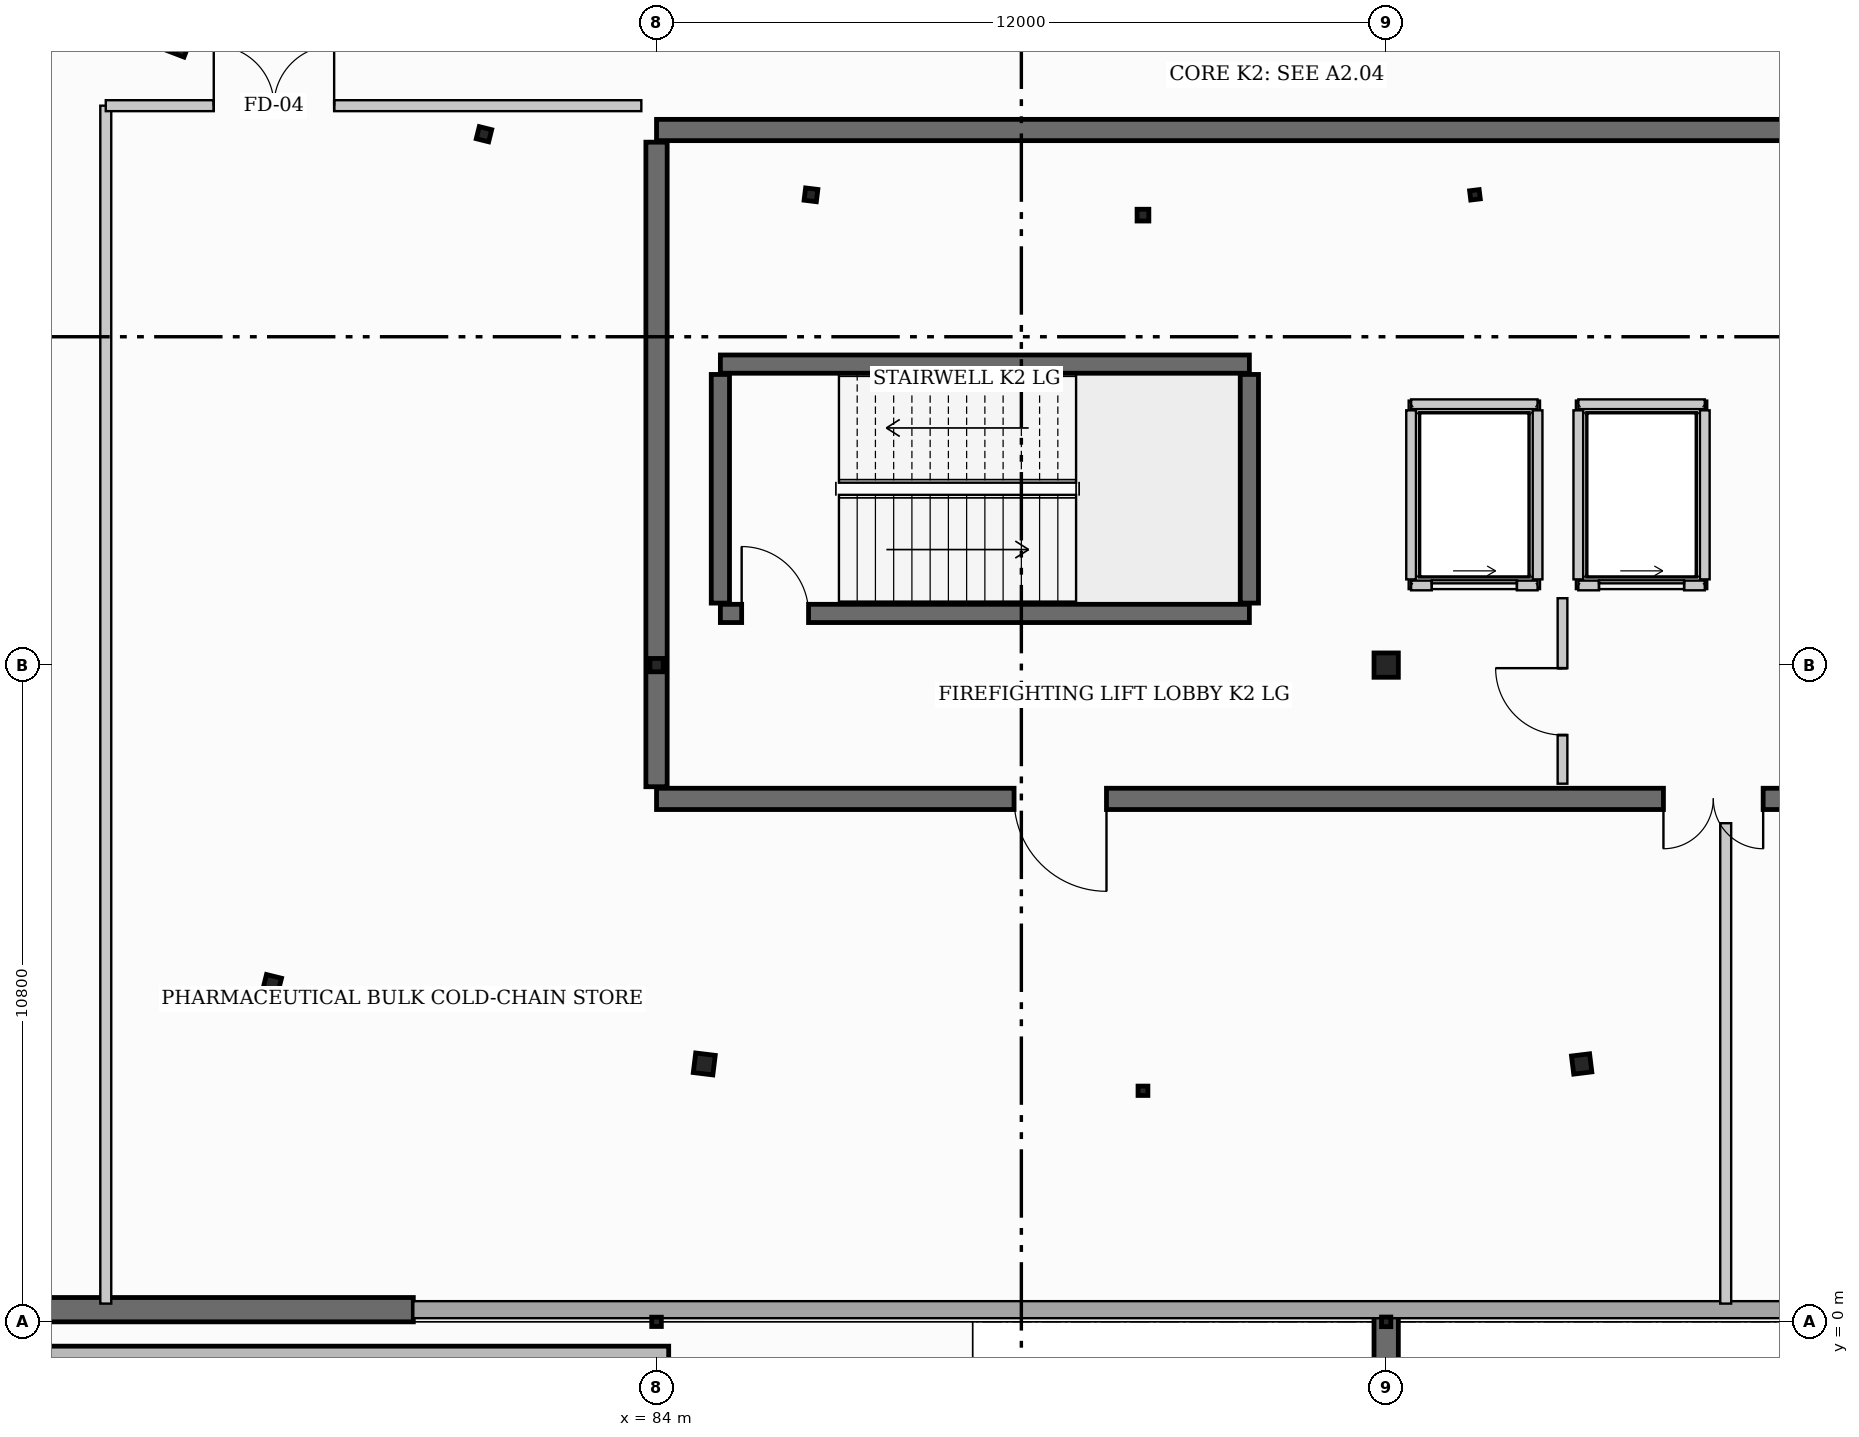
"""IFC4 building model, lengths in metres.
Left out: names, types, materials, properties, quantities, classifications, styles, units other than length and angle.
Written with IfcOpenShell. Run it as: python <this file> out.ifc"""

import sys

from ifc_helpers import new_model, si_unit, direction, frame, frame_2d, origin, origin_2d, place, context, subcontext, project, spatial, rectangle, hollow_rectangle, hollow_circle, i_section, extrude, element, fill, save


model = new_model("IFC4")
c1 = context("Model", 3, precision=1e-05, world=origin(), true_north=direction((0.0, 1.0)))
c2 = subcontext(c1, "Body", "Model", "MODEL_VIEW")
j1 = project(units=[si_unit("LENGTHUNIT", "METRE"), si_unit("PLANEANGLEUNIT", "RADIAN")], contexts=[c1])
p1 = place(None, origin())
s1 = spatial("IfcSite", under=j1, at=p1, CompositionType="ELEMENT")
p2 = place(p1, origin())
s2 = spatial("IfcBuilding", under=s1, at=p2, CompositionType="ELEMENT")
p3 = place(p2, frame((0.0, 0.0, -4.8)))
s3 = spatial("IfcBuildingStorey", under=s2, at=p3, CompositionType="ELEMENT", Elevation=-4.8)
p4 = place(p3, frame((50.0, 0.2, 0.0), z_axis=(0.0, 0.0, 1.0), x_axis=(1.0, 0.0, 0.0)))
e1 = element("IfcWall", 1, at=p4, inside=s3, PredefinedType="USERDEFINED", context=c2, shape_type="SweptSolid", body=[
    extrude(rectangle(XDim=30.0, YDim=0.4, at=frame_2d((15.0, 0.0))), origin(), (0.0, 0.0, 1.0), 4.8),
])
p5 = place(p3, frame((96.0, -4.2, 0.0), z_axis=(0.0, 0.0, 1.0), x_axis=(0.0, 1.0, 0.0)))
e2 = element("IfcWall", 2, at=p5, inside=s3, PredefinedType="USERDEFINED", context=c2, shape_type="SweptSolid", body=[
    extrude(rectangle(XDim=4.4, YDim=0.4, at=frame_2d((2.2, 0.0))), origin(), (0.0, 0.0, 1.0), 4.8),
])
p6 = place(p3, frame((84.0, 0.0, 0.0), z_axis=(0.0, 0.0, 1.0), x_axis=(0.0, 1.0, 0.0)))
e3 = element("IfcColumn", 3, at=p6, inside=s3, PredefinedType="COLUMN", context=c2, shape_type="SweptSolid", body=[
    extrude(i_section(OverallWidth=0.153, OverallDepth=0.158, WebThickness=0.007, FlangeThickness=0.01, at=origin_2d()), origin(), (0.0, 0.0, 1.0), 4.8),
])
p7 = place(p3, frame((84.0, 10.8, 0.0), z_axis=(0.0, 0.0, 1.0), x_axis=(0.0, 1.0, 0.0)))
e4 = element("IfcColumn", 4, at=p7, inside=s3, PredefinedType="COLUMN", context=c2, shape_type="SweptSolid", body=[
    extrude(hollow_circle(Radius=0.11, WallThickness=0.01, at=origin_2d()), origin(), (0.0, 0.0, 1.0), 4.8),
])
p8 = place(p3, frame((96.0, 0.0, 0.0), z_axis=(0.0, 0.0, 1.0), x_axis=(1.0, 0.0, 0.0)))
e5 = element("IfcColumn", 5, at=p8, inside=s3, PredefinedType="COLUMN", context=c2, shape_type="SweptSolid", body=[
    extrude(i_section(OverallWidth=0.153, OverallDepth=0.158, WebThickness=0.007, FlangeThickness=0.01, at=origin_2d()), origin(), (0.0, 0.0, 1.0), 4.8),
])
p9 = place(p3, frame((96.0, 10.8, 0.0), z_axis=(0.0, 0.0, 1.0), x_axis=(1.0, 0.0, 0.0)))
e6 = element("IfcColumn", 6, at=p9, inside=s3, PredefinedType="COLUMN", context=c2, shape_type="SweptSolid", body=[
    extrude(i_section(OverallWidth=0.4, OverallDepth=0.4, WebThickness=0.02, FlangeThickness=0.028, at=origin_2d()), origin(), (0.0, 0.0, 1.0), 4.8),
])
p10 = place(p3, frame((75.945, 21.176, 0.0), z_axis=(0.0, 0.0, 1.0), x_axis=(0.358367949545, 0.933580426497, 0.0)))
e7 = element("IfcColumn", 7, at=p10, inside=s3, PredefinedType="PILASTER", context=c2, shape_type="SweptSolid", body=[
    extrude(rectangle(XDim=0.5, YDim=0.8, at=origin_2d()), origin(), (0.0, 0.0, 1.0), 4.8),
])
p11 = place(p3, frame((77.678, 5.558, 0.0), z_axis=(0.0, 0.0, 1.0), x_axis=(0.2419218956, 0.970295726276, 0.0)))
e8 = element("IfcColumn", 8, at=p11, inside=s3, PredefinedType="COLUMN", context=c2, shape_type="SweptSolid", body=[
    extrude(i_section(OverallWidth=0.254, OverallDepth=0.254, WebThickness=0.009, FlangeThickness=0.014, at=origin_2d()), origin(), (0.0, 0.0, 1.0), 4.8),
])
p12 = place(p3, frame((81.162, 19.531, 0.0), z_axis=(0.0, 0.0, 1.0), x_axis=(0.2419218956, 0.970295726276, 0.0)))
e9 = element("IfcColumn", 9, at=p12, inside=s3, PredefinedType="COLUMN", context=c2, shape_type="SweptSolid", body=[
    extrude(i_section(OverallWidth=0.205, OverallDepth=0.21, WebThickness=0.009, FlangeThickness=0.014, at=origin_2d()), origin(), (0.0, 0.0, 1.0), 4.8),
])
p13 = place(p3, frame((84.785, 4.241, 0.0), z_axis=(0.0, 0.0, 1.0), x_axis=(0.121869343405, 0.992546151641, 0.0)))
e10 = element("IfcColumn", 10, at=p13, inside=s3, PredefinedType="COLUMN", context=c2, shape_type="SweptSolid", body=[
    extrude(hollow_circle(Radius=0.162, WallThickness=0.013, at=origin_2d()), origin(), (0.0, 0.0, 1.0), 4.8),
])
p14 = place(p3, frame((86.54, 18.534, 0.0), z_axis=(0.0, 0.0, 1.0), x_axis=(0.121869343405, 0.992546151641, 0.0)))
e11 = element("IfcColumn", 11, at=p14, inside=s3, PredefinedType="COLUMN", context=c2, shape_type="SweptSolid", body=[
    extrude(i_section(OverallWidth=0.203, OverallDepth=0.203, WebThickness=0.007, FlangeThickness=0.011, at=origin_2d()), origin(), (0.0, 0.0, 1.0), 4.8),
])
p15 = place(p3, frame((92.0, 3.8, 0.0), z_axis=(0.0, 0.0, 1.0), x_axis=(0.0, 1.0, 0.0)))
e12 = element("IfcColumn", 12, at=p15, inside=s3, PredefinedType="COLUMN", context=c2, shape_type="SweptSolid", body=[
    extrude(i_section(OverallWidth=0.154, OverallDepth=0.162, WebThickness=0.008, FlangeThickness=0.011, at=origin_2d()), origin(), (0.0, 0.0, 1.0), 4.8),
])
p16 = place(p3, frame((92.0, 18.2, 0.0), z_axis=(0.0, 0.0, 1.0), x_axis=(0.0, 1.0, 0.0)))
e13 = element("IfcColumn", 13, at=p16, inside=s3, PredefinedType="COLUMN", context=c2, shape_type="SweptSolid", body=[
    extrude(hollow_circle(Radius=0.097, WallThickness=0.008, at=origin_2d()), origin(), (0.0, 0.0, 1.0), 4.8),
])
p17 = place(p3, frame((99.215, 4.241, 0.0), z_axis=(0.0, 0.0, 1.0), x_axis=(-0.121869343405, 0.992546151641, 0.0)))
e14 = element("IfcColumn", 14, at=p17, inside=s3, PredefinedType="COLUMN", context=c2, shape_type="SweptSolid", body=[
    extrude(hollow_rectangle(XDim=0.3, YDim=0.3, WallThickness=0.012, at=origin_2d()), origin(), (0.0, 0.0, 1.0), 4.8),
])
p18 = place(p3, frame((97.46, 18.534, 0.0), z_axis=(0.0, 0.0, 1.0), x_axis=(-0.121869343405, 0.992546151641, 0.0)))
e15 = element("IfcColumn", 15, at=p18, inside=s3, PredefinedType="COLUMN", context=c2, shape_type="SweptSolid", body=[
    extrude(i_section(OverallWidth=0.153, OverallDepth=0.158, WebThickness=0.007, FlangeThickness=0.01, at=origin_2d()), origin(), (0.0, 0.0, 1.0), 4.8),
])
p19 = place(p3, frame((84.0, 19.6, 0.0), z_axis=(0.0, 0.0, 1.0), x_axis=(1.0, 0.0, 0.0)))
e16 = element("IfcWall", 16, at=p19, inside=s3, PredefinedType="SHEAR", context=c2, shape_type="SweptSolid", body=[
    extrude(rectangle(XDim=20.4, YDim=0.35, at=frame_2d((10.2, 0.0))), origin(), (0.0, 0.0, 1.0), 4.8),
])
p20 = place(p3, frame((104.4, 8.6, 0.0), z_axis=(0.0, 0.0, 1.0), x_axis=(-1.0, 0.0, 0.0)))
e17 = element("IfcWall", 17, at=p20, inside=s3, PredefinedType="SHEAR", context=c2, shape_type="SweptSolid", body=[
    extrude(rectangle(XDim=20.4, YDim=0.35, at=frame_2d((10.2, 0.0))), origin(), (0.0, 0.0, 1.0), 4.8),
])
p21 = place(p20, frame((2.2, 0.0, 0.0)))
e18 = element("IfcOpeningElement", 18, at=p21, cuts=e17, PredefinedType="OPENING", context=c2, shape_type="SweptSolid", body=[
    extrude(rectangle(XDim=1.64, YDim=2.2, at=frame_2d((0.82, 1.1))), frame((0.0, 0.185, 0.0), z_axis=(0.0, -1.0, 0.0), x_axis=(1.0, 0.0, 0.0)), (0.0, 0.0, 1.0), 0.37),
])
p22 = place(p20, frame((13.0, 0.0, 0.0)))
e19 = element("IfcOpeningElement", 19, at=p22, cuts=e17, PredefinedType="OPENING", context=c2, shape_type="SweptSolid", body=[
    extrude(rectangle(XDim=1.52, YDim=2.16, at=frame_2d((0.76, 1.08))), frame((0.0, 0.185, 0.0), z_axis=(0.0, -1.0, 0.0), x_axis=(1.0, 0.0, 0.0)), (0.0, 0.0, 1.0), 0.37),
])
p23 = place(p3, frame((84.0, 8.8, 0.0), z_axis=(0.0, 0.0, 1.0), x_axis=(0.0, 1.0, 0.0)))
e20 = element("IfcWall", 20, at=p23, inside=s3, PredefinedType="SHEAR", context=c2, shape_type="SweptSolid", body=[
    extrude(rectangle(XDim=10.6, YDim=0.35, at=frame_2d((5.3, 0.0))), origin(), (0.0, 0.0, 1.0), 4.8),
])
p24 = place(p3, frame((85.05, 11.65, 0.0), z_axis=(0.0, 0.0, 1.0), x_axis=(1.0, 0.0, 0.0)))
e21 = element("IfcWall", 21, at=p24, inside=s3, PredefinedType="SHEAR", context=c2, shape_type="SweptSolid", body=[
    extrude(rectangle(XDim=8.7, YDim=0.3, at=frame_2d((4.35, 0.0))), origin(), (0.0, 0.0, 1.0), 4.8),
])
p25 = place(p24, frame((0.35, 0.0, 0.0)))
e22 = element("IfcOpeningElement", 22, at=p25, cuts=e21, PredefinedType="OPENING", context=c2, shape_type="SweptSolid", body=[
    extrude(rectangle(XDim=1.1, YDim=2.15, at=frame_2d((0.55, 1.075))), frame((0.0, 0.16, 0.0), z_axis=(0.0, -1.0, 0.0), x_axis=(1.0, 0.0, 0.0)), (0.0, 0.0, 1.0), 0.32),
])
p26 = place(p3, frame((93.75, 15.75, 0.0), z_axis=(0.0, 0.0, 1.0), x_axis=(-1.0, 0.0, 0.0)))
e23 = element("IfcWall", 23, at=p26, inside=s3, PredefinedType="SHEAR", context=c2, shape_type="SweptSolid", body=[
    extrude(rectangle(XDim=8.7, YDim=0.3, at=frame_2d((4.35, 0.0))), origin(), (0.0, 0.0, 1.0), 4.8),
])
for number, where, z_axis, x_axis in (
    (24, (85.05, 11.82, 0.0), (0.0, 0.0, 1.0), (0.0, 1.0, 0.0)),
    (25, (93.75, 11.82, 0.0), (0.0, 0.0, 1.0), (0.0, 1.0, 0.0)),
):
    element("IfcWall", number, at=place(p3, frame(where, z_axis=z_axis, x_axis=x_axis)), inside=s3, PredefinedType="SHEAR", context=c2, shape_type="SweptSolid", body=[
        extrude(rectangle(XDim=3.76, YDim=0.3, at=frame_2d((1.88, 0.0))), origin(), (0.0, 0.0, 1.0), 4.8),
    ])
p27 = place(p3, frame((132.0, 0.2, 0.0), z_axis=(0.0, 0.0, 1.0), x_axis=(-1.0, 0.0, 0.0)))
e26 = element("IfcWall", 26, at=p27, inside=s3, PredefinedType="STANDARD", context=c2, shape_type="SweptSolid", body=[
    extrude(rectangle(XDim=52.0, YDim=0.28, at=frame_2d((26.0, 0.0))), origin(), (0.0, 0.0, 1.0), 3.465),
])
p28 = place(p3, frame((96.41, 12.11, 0.0), z_axis=(0.0, 0.0, 1.0), x_axis=(1.0, 0.0, 0.0)))
e27 = element("IfcWall", 27, at=p28, inside=s3, PredefinedType="PARTITIONING", context=c2, shape_type="SweptSolid", body=[
    extrude(rectangle(XDim=2.08, YDim=0.16, at=frame_2d((1.04, 0.0))), origin(), (0.0, 0.0, 1.0), 4.43),
])
p29 = place(p28, frame((0.34, 0.0, 0.0)))
e28 = element("IfcOpeningElement", 28, at=p29, cuts=e27, PredefinedType="OPENING", context=c2, shape_type="SweptSolid", body=[
    extrude(rectangle(XDim=1.4, YDim=2.2, at=frame_2d((0.7, 1.1))), frame((0.0, 0.09, 0.0), z_axis=(0.0, -1.0, 0.0), x_axis=(1.0, 0.0, 0.0)), (0.0, 0.0, 1.0), 0.18),
])
p30 = place(p3, frame((98.49, 15.09, 0.0), z_axis=(0.0, 0.0, 1.0), x_axis=(-1.0, 0.0, 0.0)))
e29 = element("IfcWall", 29, at=p30, inside=s3, PredefinedType="PARTITIONING", context=c2, shape_type="SweptSolid", body=[
    extrude(rectangle(XDim=2.08, YDim=0.16, at=frame_2d((1.04, 0.0))), origin(), (0.0, 0.0, 1.0), 4.43),
])
for number, where, z_axis, x_axis in (
    (30, (96.41, 14.99, 0.0), (0.0, 0.0, 1.0), (0.0, -1.0, 0.0)),
    (31, (98.49, 12.21, 0.0), (0.0, 0.0, 1.0), (0.0, 1.0, 0.0)),
):
    element("IfcWall", number, at=place(p3, frame(where, z_axis=z_axis, x_axis=x_axis)), inside=s3, PredefinedType="PARTITIONING", context=c2, shape_type="SweptSolid", body=[
        extrude(rectangle(XDim=2.78, YDim=0.16, at=frame_2d((1.39, 0.0))), origin(), (0.0, 0.0, 1.0), 4.43),
    ])
p31 = place(p3, frame((99.16, 12.11, 0.0), z_axis=(0.0, 0.0, 1.0), x_axis=(1.0, 0.0, 0.0)))
e32 = element("IfcWall", 32, at=p31, inside=s3, PredefinedType="PARTITIONING", context=c2, shape_type="SweptSolid", body=[
    extrude(rectangle(XDim=2.08, YDim=0.16, at=frame_2d((1.04, 0.0))), origin(), (0.0, 0.0, 1.0), 4.43),
])
p32 = place(p31, frame((0.34, 0.0, 0.0)))
e33 = element("IfcOpeningElement", 33, at=p32, cuts=e32, PredefinedType="OPENING", context=c2, shape_type="SweptSolid", body=[
    extrude(rectangle(XDim=1.4, YDim=2.2, at=frame_2d((0.7, 1.1))), frame((0.0, 0.09, 0.0), z_axis=(0.0, -1.0, 0.0), x_axis=(1.0, 0.0, 0.0)), (0.0, 0.0, 1.0), 0.18),
])
p33 = place(p3, frame((101.24, 15.09, 0.0), z_axis=(0.0, 0.0, 1.0), x_axis=(-1.0, 0.0, 0.0)))
e34 = element("IfcWall", 34, at=p33, inside=s3, PredefinedType="PARTITIONING", context=c2, shape_type="SweptSolid", body=[
    extrude(rectangle(XDim=2.08, YDim=0.16, at=frame_2d((1.04, 0.0))), origin(), (0.0, 0.0, 1.0), 4.43),
])
for number, where, z_axis, x_axis in (
    (35, (99.16, 14.99, 0.0), (0.0, 0.0, 1.0), (0.0, -1.0, 0.0)),
    (36, (101.24, 12.21, 0.0), (0.0, 0.0, 1.0), (0.0, 1.0, 0.0)),
):
    element("IfcWall", number, at=place(p3, frame(where, z_axis=z_axis, x_axis=x_axis)), inside=s3, PredefinedType="PARTITIONING", context=c2, shape_type="SweptSolid", body=[
        extrude(rectangle(XDim=2.78, YDim=0.16, at=frame_2d((1.39, 0.0))), origin(), (0.0, 0.0, 1.0), 4.43),
    ])
p34 = place(p3, frame((98.9, 8.85, 0.0), z_axis=(0.0, 0.0, 1.0), x_axis=(0.0, 1.0, 0.0)))
e37 = element("IfcWall", 37, at=p34, inside=s3, PredefinedType="PARTITIONING", context=c2, shape_type="SweptSolid", body=[
    extrude(rectangle(XDim=3.05, YDim=0.16, at=frame_2d((1.525, 0.0))), origin(), (0.0, 0.0, 1.0), 3.961),
])
p35 = place(p34, frame((0.8, 0.0, 0.0)))
e38 = element("IfcOpeningElement", 38, at=p35, cuts=e37, PredefinedType="OPENING", context=c2, shape_type="SweptSolid", body=[
    extrude(rectangle(XDim=1.1, YDim=2.15, at=frame_2d((0.55, 1.075))), frame((0.0, 0.09, 0.0), z_axis=(0.0, -1.0, 0.0), x_axis=(1.0, 0.0, 0.0)), (0.0, 0.0, 1.0), 0.18),
])
p36 = place(p3, frame((74.942, 0.3, 0.0), z_axis=(0.0, 0.0, 1.0), x_axis=(0.0, 1.0, 0.0)))
e39 = element("IfcWall", 39, at=p36, inside=s3, PredefinedType="PARTITIONING", context=c2, shape_type="SweptSolid", body=[
    extrude(rectangle(XDim=19.7, YDim=0.18, at=frame_2d((9.85, 0.0))), origin(), (0.0, 0.0, 1.0), 4.065),
])
p37 = place(p3, frame((74.942, 20.0, 0.0), z_axis=(0.0, 0.0, 1.0), x_axis=(1.0, 0.0, 0.0)))
e40 = element("IfcWall", 40, at=p37, inside=s3, PredefinedType="PARTITIONING", context=c2, shape_type="SweptSolid", body=[
    extrude(rectangle(XDim=8.808, YDim=0.18, at=frame_2d((4.404, 0.0))), origin(), (0.0, 0.0, 1.0), 3.515),
])
p38 = place(p37, frame((1.776, 0.0, 0.0)))
e41 = element("IfcOpeningElement", 41, at=p38, cuts=e40, PredefinedType="OPENING", context=c2, shape_type="SweptSolid", body=[
    extrude(rectangle(XDim=1.98, YDim=2.26, at=frame_2d((0.99, 1.13))), frame((0.0, 0.1, 0.0), z_axis=(0.0, -1.0, 0.0), x_axis=(1.0, 0.0, 0.0)), (0.0, 0.0, 1.0), 0.2),
])
p39 = place(p3, frame((101.584, 0.3, 0.0), z_axis=(0.0, 0.0, 1.0), x_axis=(0.0, 1.0, 0.0)))
e42 = element("IfcWall", 42, at=p39, inside=s3, PredefinedType="PARTITIONING", context=c2, shape_type="SweptSolid", body=[
    extrude(rectangle(XDim=7.9, YDim=0.18, at=frame_2d((3.95, 0.0))), origin(), (0.0, 0.0, 1.0), 3.961),
])
p40 = place(p29, origin())
e43 = element("IfcDoor", 43, at=p40, inside=s3, OperationType="SLIDING_TO_LEFT", PredefinedType="DOOR", context=c2, shape_type="SweptSolid", body=[
    extrude(rectangle(XDim=1.4, YDim=2.2, at=frame_2d((0.7, 1.1))), frame((0.0, 0.025, 0.0), z_axis=(0.0, -1.0, 0.0), x_axis=(1.0, 0.0, 0.0)), (0.0, 0.0, 1.0), 0.05),
])
fill(e28, e43)
p41 = place(p32, origin())
e44 = element("IfcDoor", 44, at=p41, inside=s3, OperationType="SLIDING_TO_LEFT", PredefinedType="DOOR", context=c2, shape_type="SweptSolid", body=[
    extrude(rectangle(XDim=1.4, YDim=2.2, at=frame_2d((0.7, 1.1))), frame((0.0, 0.025, 0.0), z_axis=(0.0, -1.0, 0.0), x_axis=(1.0, 0.0, 0.0)), (0.0, 0.0, 1.0), 0.05),
])
fill(e33, e44)
p42 = place(p25, origin())
e45 = element("IfcDoor", 45, at=p42, inside=s3, OperationType="SINGLE_SWING_LEFT", PredefinedType="DOOR", context=c2, shape_type="SweptSolid", body=[
    extrude(rectangle(XDim=1.1, YDim=2.15, at=frame_2d((0.55, 1.075))), frame((0.0, 0.025, 0.0), z_axis=(0.0, -1.0, 0.0), x_axis=(1.0, 0.0, 0.0)), (0.0, 0.0, 1.0), 0.05),
])
fill(e22, e45)
p43 = place(p21, origin())
e46 = element("IfcDoor", 46, at=p43, inside=s3, OperationType="DOUBLE_DOOR_SINGLE_SWING", PredefinedType="DOOR", context=c2, shape_type="SweptSolid", body=[
    extrude(rectangle(XDim=1.64, YDim=2.2, at=frame_2d((0.82, 1.1))), frame((0.0, 0.025, 0.0), z_axis=(0.0, -1.0, 0.0), x_axis=(1.0, 0.0, 0.0)), (0.0, 0.0, 1.0), 0.05),
])
fill(e18, e46)
p44 = place(p22, origin())
e47 = element("IfcDoor", 47, at=p44, inside=s3, OperationType="SINGLE_SWING_LEFT", PredefinedType="DOOR", context=c2, shape_type="SweptSolid", body=[
    extrude(rectangle(XDim=1.52, YDim=2.16, at=frame_2d((0.76, 1.08))), frame((0.0, 0.025, 0.0), z_axis=(0.0, -1.0, 0.0), x_axis=(1.0, 0.0, 0.0)), (0.0, 0.0, 1.0), 0.05),
])
fill(e19, e47)
p45 = place(p35, origin())
e48 = element("IfcDoor", 48, at=p45, inside=s3, OperationType="SINGLE_SWING_RIGHT", PredefinedType="DOOR", context=c2, shape_type="SweptSolid", body=[
    extrude(rectangle(XDim=1.1, YDim=2.15, at=frame_2d((0.55, 1.075))), frame((0.0, 0.025, 0.0), z_axis=(0.0, -1.0, 0.0), x_axis=(1.0, 0.0, 0.0)), (0.0, 0.0, 1.0), 0.05),
])
fill(e38, e48)
p46 = place(p38, origin())
e49 = element("IfcDoor", 49, at=p46, inside=s3, OperationType="DOUBLE_DOOR_SINGLE_SWING", PredefinedType="DOOR", context=c2, shape_type="SweptSolid", body=[
    extrude(rectangle(XDim=1.98, YDim=2.26, at=frame_2d((0.99, 1.13))), frame((0.0, 0.025, 0.0), z_axis=(0.0, -1.0, 0.0), x_axis=(1.0, 0.0, 0.0)), (0.0, 0.0, 1.0), 0.05),
])
fill(e41, e49)
save(model, sys.argv[1])
